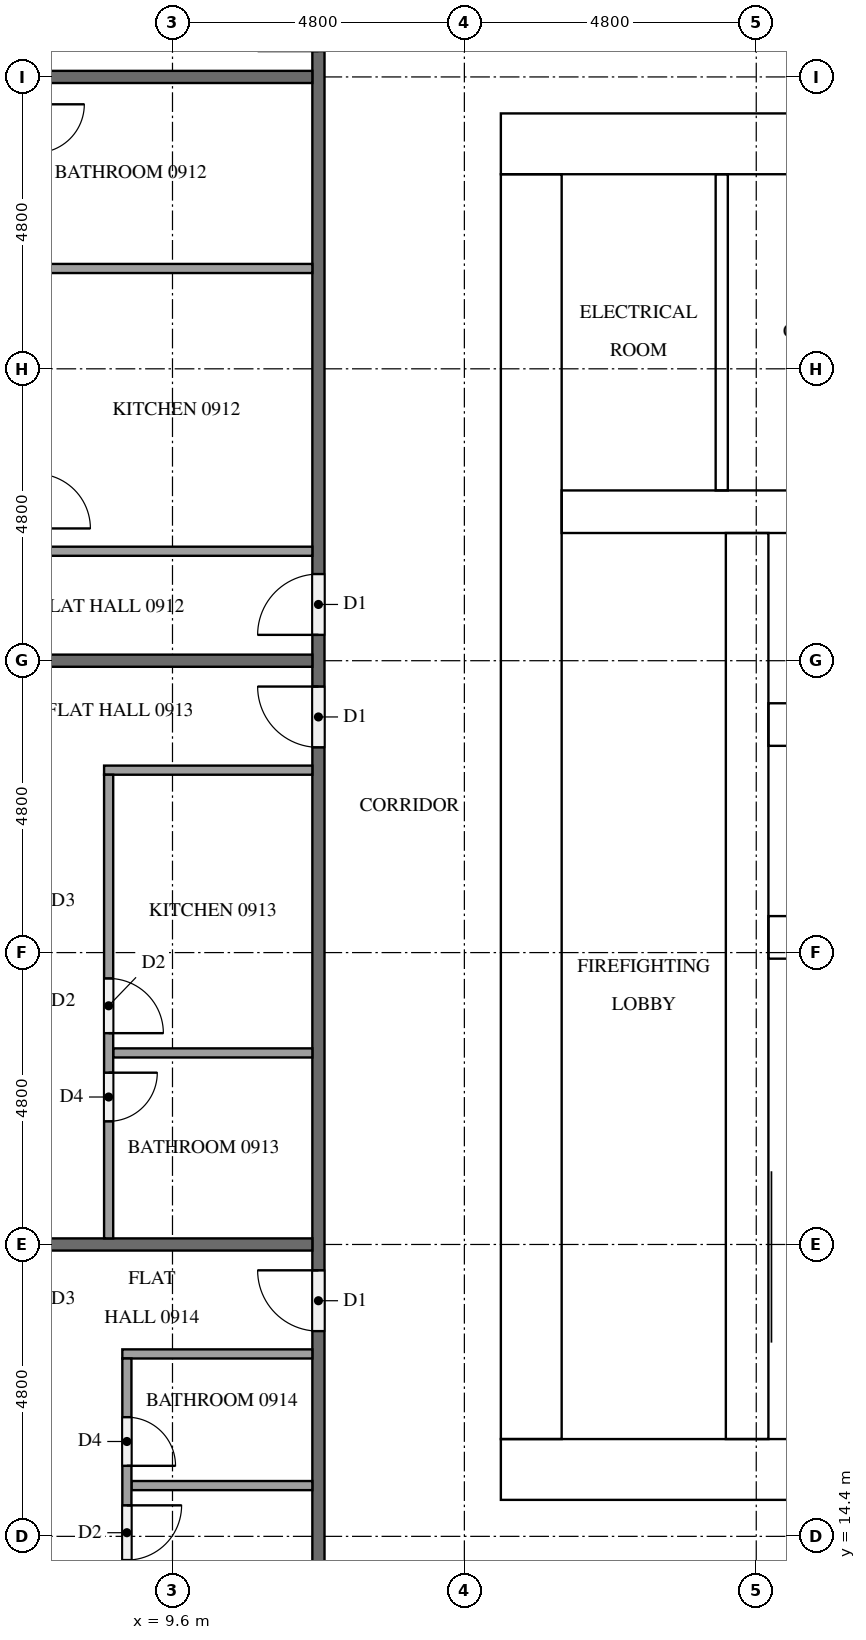
"""IFC4 building model, lengths in metres.
Left out: names, types, materials, properties, quantities, classifications, styles, units other than length and angle.
Written with IfcOpenShell. Run it as: python <this file> out.ifc"""

import sys

from ifc_helpers import new_model, si_unit, direction, frame, frame_2d, origin, place, context, subcontext, project, spatial, rectangle, extrude, element, fill, save


model = new_model("IFC4")
c1 = context("Model", 3, precision=1e-05, world=origin(), true_north=direction((0.0, 1.0)))
c2 = subcontext(c1, "Body", "Model", "MODEL_VIEW")
j1 = project(units=[si_unit("LENGTHUNIT", "METRE"), si_unit("PLANEANGLEUNIT", "RADIAN")], contexts=[c1])
p1 = place(None, origin())
s1 = spatial("IfcSite", under=j1, at=p1, CompositionType="ELEMENT")
p2 = place(p1, origin())
s2 = spatial("IfcBuilding", under=s1, at=p2, CompositionType="ELEMENT")
p3 = place(p2, frame((0.0, 0.0, 39.9)))
s3 = spatial("IfcBuildingStorey", under=s2, at=p3, CompositionType="ELEMENT", Elevation=39.9)
p4 = place(p3, frame((15.0, 15.5, 0.0), z_axis=(0.0, 0.0, 1.0), x_axis=(1.0, 0.0, 0.0)))
e1 = element("IfcWall", 1, at=p4, inside=s3, PredefinedType="SHEAR", context=c2, shape_type="SweptSolid", body=[
    extrude(rectangle(XDim=32.4, YDim=1.0, at=frame_2d((16.2, 0.0))), origin(), (0.0, 0.0, 1.0), 3.2),
])
p5 = place(p4, frame((15.3, 0.0, 0.0)))
e2 = element("IfcOpeningElement", 2, at=p5, cuts=e1, PredefinedType="OPENING", context=c2, shape_type="SweptSolid", body=[
    extrude(rectangle(XDim=1.8, YDim=2.1, at=frame_2d((0.9, 1.05))), frame((0.0, 0.51, 0.0), z_axis=(0.0, -1.0, 0.0), x_axis=(1.0, 0.0, 0.0)), (0.0, 0.0, 1.0), 1.02),
])
p6 = place(p3, frame((15.0, 37.3, 0.0), z_axis=(0.0, 0.0, 1.0), x_axis=(1.0, 0.0, 0.0)))
e3 = element("IfcWall", 3, at=p6, inside=s3, PredefinedType="SHEAR", context=c2, shape_type="SweptSolid", body=[
    extrude(rectangle(XDim=32.4, YDim=1.0, at=frame_2d((16.2, 0.0))), origin(), (0.0, 0.0, 1.0), 3.2),
])
p7 = place(p6, frame((15.3, 0.0, 0.0)))
e4 = element("IfcOpeningElement", 4, at=p7, cuts=e3, PredefinedType="OPENING", context=c2, shape_type="SweptSolid", body=[
    extrude(rectangle(XDim=1.8, YDim=2.1, at=frame_2d((0.9, 1.05))), frame((0.0, 0.51, 0.0), z_axis=(0.0, -1.0, 0.0), x_axis=(1.0, 0.0, 0.0)), (0.0, 0.0, 1.0), 1.02),
])
p8 = place(p6, frame((1.766, 0.0, 0.0)))
e5 = element("IfcOpeningElement", 5, at=p8, cuts=e3, PredefinedType="OPENING", context=c2, shape_type="SweptSolid", body=[
    extrude(rectangle(XDim=1.0, YDim=2.1, at=frame_2d((0.5, 1.05))), frame((0.0, 0.51, 0.0), z_axis=(0.0, -1.0, 0.0), x_axis=(1.0, 0.0, 0.0)), (0.0, 0.0, 1.0), 1.02),
])
p9 = place(p6, frame((5.241, 0.0, 0.0)))
e6 = element("IfcOpeningElement", 6, at=p9, cuts=e3, PredefinedType="OPENING", context=c2, shape_type="SweptSolid", body=[
    extrude(rectangle(XDim=1.0, YDim=2.1, at=frame_2d((0.5, 1.05))), frame((0.0, 0.51, 0.0), z_axis=(0.0, -1.0, 0.0), x_axis=(1.0, 0.0, 0.0)), (0.0, 0.0, 1.0), 1.02),
])
p10 = place(p3, frame((15.5, 16.0, 0.0), z_axis=(0.0, 0.0, 1.0), x_axis=(0.0, 1.0, 0.0)))
e7 = element("IfcWall", 7, at=p10, inside=s3, PredefinedType="SHEAR", context=c2, shape_type="SweptSolid", body=[
    extrude(rectangle(XDim=20.8, YDim=1.0, at=frame_2d((10.4, 0.0))), origin(), (0.0, 0.0, 1.0), 3.2),
])
p11 = place(p10, frame((4.76, 0.0, 0.0)))
e8 = element("IfcOpeningElement", 8, at=p11, cuts=e7, PredefinedType="OPENING", context=c2, shape_type="SweptSolid", body=[
    extrude(rectangle(XDim=1.2, YDim=2.1, at=frame_2d((0.6, 1.05))), frame((0.0, 0.51, 0.0), z_axis=(0.0, -1.0, 0.0), x_axis=(1.0, 0.0, 0.0)), (0.0, 0.0, 1.0), 1.02),
])
p12 = place(p3, frame((19.05, 16.0, 0.0), z_axis=(0.0, 0.0, 1.0), x_axis=(0.0, 1.0, 0.0)))
e9 = element("IfcWall", 9, at=p12, inside=s3, PredefinedType="SHEAR", context=c2, shape_type="SweptSolid", body=[
    extrude(rectangle(XDim=14.9, YDim=0.7, at=frame_2d((7.45, 0.0))), origin(), (0.0, 0.0, 1.0), 3.2),
])
p13 = place(p12, frame((9.45, 0.0, 0.0)))
e10 = element("IfcOpeningElement", 10, at=p13, cuts=e9, PredefinedType="OPENING", context=c2, shape_type="SweptSolid", body=[
    extrude(rectangle(XDim=1.1, YDim=2.1, at=frame_2d((0.55, 1.05))), frame((0.0, 0.36, 0.0), z_axis=(0.0, -1.0, 0.0), x_axis=(1.0, 0.0, 0.0)), (0.0, 0.0, 1.0), 0.72),
])
p14 = place(p12, frame((12.95, 0.0, 0.0)))
e11 = element("IfcOpeningElement", 11, at=p14, cuts=e9, PredefinedType="OPENING", context=c2, shape_type="SweptSolid", body=[
    extrude(rectangle(XDim=1.1, YDim=2.1, at=frame_2d((0.55, 1.05))), frame((0.0, 0.36, 0.0), z_axis=(0.0, -1.0, 0.0), x_axis=(1.0, 0.0, 0.0)), (0.0, 0.0, 1.0), 0.72),
])
p15 = place(p12, frame((0.2, 0.0, 0.0)))
e12 = element("IfcOpeningElement", 12, at=p15, cuts=e9, PredefinedType="OPENING", context=c2, shape_type="SweptSolid", body=[
    extrude(rectangle(XDim=1.2, YDim=2.1, at=frame_2d((0.6, 1.05))), frame((0.0, 0.36, 0.0), z_axis=(0.0, -1.0, 0.0), x_axis=(1.0, 0.0, 0.0)), (0.0, 0.0, 1.0), 0.72),
])
for number, where, z_axis, x_axis in (
    (13, (19.4, 24.25, 0.0), (0.0, 0.0, 1.0), (1.0, 0.0, 0.0)),
    (14, (19.4, 27.75, 0.0), (0.0, 0.0, 1.0), (1.0, 0.0, 0.0)),
):
    element("IfcWall", number, at=place(p3, frame(where, z_axis=z_axis, x_axis=x_axis)), inside=s3, PredefinedType="SHEAR", context=c2, shape_type="SweptSolid", body=[
        extrude(rectangle(XDim=3.35, YDim=0.7, at=frame_2d((1.675, 0.0))), origin(), (0.0, 0.0, 1.0), 3.2),
    ])
p16 = place(p3, frame((16.0, 31.25, 0.0), z_axis=(0.0, 0.0, 1.0), x_axis=(1.0, 0.0, 0.0)))
e15 = element("IfcWall", 15, at=p16, inside=s3, PredefinedType="SHEAR", context=c2, shape_type="SweptSolid", body=[
    extrude(rectangle(XDim=6.75, YDim=0.7, at=frame_2d((3.375, 0.0))), origin(), (0.0, 0.0, 1.0), 3.2),
])
p17 = place(p3, frame((18.633, 31.6, 0.0), z_axis=(0.0, 0.0, 1.0), x_axis=(0.0, 1.0, 0.0)))
e16 = element("IfcWall", 16, at=p17, inside=s3, PredefinedType="PARTITIONING", context=c2, shape_type="SweptSolid", body=[
    extrude(rectangle(XDim=5.2, YDim=0.2, at=frame_2d((2.6, 0.0))), origin(), (0.0, 0.0, 1.0), 3.2),
])
p18 = place(p3, frame((12.0, 12.1, 0.0), z_axis=(0.0, 0.0, 1.0), x_axis=(0.0, 1.0, 0.0)))
e17 = element("IfcWall", 17, at=p18, inside=s3, PredefinedType="PARTITIONING", context=c2, shape_type="SweptSolid", body=[
    extrude(rectangle(XDim=28.6, YDim=0.2, at=frame_2d((14.3, 0.0))), origin(), (0.0, 0.0, 1.0), 3.2),
])
p19 = place(p18, frame((26.725, 0.0, 0.0)))
e18 = element("IfcOpeningElement", 18, at=p19, cuts=e17, PredefinedType="OPENING", context=c2, shape_type="SweptSolid", body=[
    extrude(rectangle(XDim=1.0, YDim=2.1, at=frame_2d((0.5, 1.05))), frame((0.0, 0.11, 0.0), z_axis=(0.0, -1.0, 0.0), x_axis=(1.0, 0.0, 0.0)), (0.0, 0.0, 1.0), 0.22),
])
p20 = place(p18, frame((17.125, 0.0, 0.0)))
e19 = element("IfcOpeningElement", 19, at=p20, cuts=e17, PredefinedType="OPENING", context=c2, shape_type="SweptSolid", body=[
    extrude(rectangle(XDim=1.0, YDim=2.1, at=frame_2d((0.5, 1.05))), frame((0.0, 0.11, 0.0), z_axis=(0.0, -1.0, 0.0), x_axis=(1.0, 0.0, 0.0)), (0.0, 0.0, 1.0), 0.22),
])
p21 = place(p18, frame((15.275, 0.0, 0.0)))
e20 = element("IfcOpeningElement", 20, at=p21, cuts=e17, PredefinedType="OPENING", context=c2, shape_type="SweptSolid", body=[
    extrude(rectangle(XDim=1.0, YDim=2.1, at=frame_2d((0.5, 1.05))), frame((0.0, 0.11, 0.0), z_axis=(0.0, -1.0, 0.0), x_axis=(1.0, 0.0, 0.0)), (0.0, 0.0, 1.0), 0.22),
])
p22 = place(p18, frame((5.675, 0.0, 0.0)))
e21 = element("IfcOpeningElement", 21, at=p22, cuts=e17, PredefinedType="OPENING", context=c2, shape_type="SweptSolid", body=[
    extrude(rectangle(XDim=1.0, YDim=2.1, at=frame_2d((0.5, 1.05))), frame((0.0, 0.11, 0.0), z_axis=(0.0, -1.0, 0.0), x_axis=(1.0, 0.0, 0.0)), (0.0, 0.0, 1.0), 0.22),
])
for number, where, z_axis, x_axis in (
    (22, (0.1, 38.4, 0.0), (0.0, 0.0, 1.0), (1.0, 0.0, 0.0)),
    (23, (0.1, 28.8, 0.0), (0.0, 0.0, 1.0), (1.0, 0.0, 0.0)),
    (24, (0.1, 19.2, 0.0), (0.0, 0.0, 1.0), (1.0, 0.0, 0.0)),
):
    element("IfcWall", number, at=place(p3, frame(where, z_axis=z_axis, x_axis=x_axis)), inside=s3, PredefinedType="PARTITIONING", context=c2, shape_type="SweptSolid", body=[
        extrude(rectangle(XDim=11.8, YDim=0.2, at=frame_2d((5.9, 0.0))), origin(), (0.0, 0.0, 1.0), 3.2),
    ])
p23 = place(p3, frame((11.9, 35.25, 0.0), z_axis=(0.0, 0.0, 1.0), x_axis=(-1.0, 0.0, 0.0)))
e25 = element("IfcWall", 25, at=p23, inside=s3, PredefinedType="PARTITIONING", context=c2, shape_type="SweptSolid", body=[
    extrude(rectangle(XDim=4.475, YDim=0.15, at=frame_2d((2.237, 0.0))), origin(), (0.0, 0.0, 1.0), 3.2),
])
p24 = place(p3, frame((11.9, 30.6, 0.0), z_axis=(0.0, 0.0, 1.0), x_axis=(-1.0, 0.0, 0.0)))
e26 = element("IfcWall", 26, at=p24, inside=s3, PredefinedType="PARTITIONING", context=c2, shape_type="SweptSolid", body=[
    extrude(rectangle(XDim=4.625, YDim=0.15, at=frame_2d((2.312, 0.0))), origin(), (0.0, 0.0, 1.0), 3.2),
])
p25 = place(p3, frame((11.9, 22.35, 0.0), z_axis=(0.0, 0.0, 1.0), x_axis=(-1.0, 0.0, 0.0)))
e27 = element("IfcWall", 27, at=p25, inside=s3, PredefinedType="PARTITIONING", context=c2, shape_type="SweptSolid", body=[
    extrude(rectangle(XDim=3.275, YDim=0.15, at=frame_2d((1.637, 0.0))), origin(), (0.0, 0.0, 1.0), 3.2),
])
p26 = place(p3, frame((11.9, 27.0, 0.0), z_axis=(0.0, 0.0, 1.0), x_axis=(-1.0, 0.0, 0.0)))
e28 = element("IfcWall", 28, at=p26, inside=s3, PredefinedType="PARTITIONING", context=c2, shape_type="SweptSolid", body=[
    extrude(rectangle(XDim=3.425, YDim=0.15, at=frame_2d((1.712, 0.0))), origin(), (0.0, 0.0, 1.0), 3.2),
])
p27 = place(p3, frame((8.55, 26.925, 0.0), z_axis=(0.0, 0.0, 1.0), x_axis=(0.0, -1.0, 0.0)))
e29 = element("IfcWall", 29, at=p27, inside=s3, PredefinedType="PARTITIONING", context=c2, shape_type="SweptSolid", body=[
    extrude(rectangle(XDim=7.625, YDim=0.15, at=frame_2d((3.812, 0.0))), origin(), (0.0, 0.0, 1.0), 3.2),
])
p28 = place(p27, frame((3.35, 0.0, 0.0)))
e30 = element("IfcOpeningElement", 30, at=p28, cuts=e29, PredefinedType="OPENING", context=c2, shape_type="SweptSolid", body=[
    extrude(rectangle(XDim=0.9, YDim=2.1, at=frame_2d((0.45, 1.05))), frame((0.0, 0.085, 0.0), z_axis=(0.0, -1.0, 0.0), x_axis=(1.0, 0.0, 0.0)), (0.0, 0.0, 1.0), 0.17),
])
p29 = place(p27, frame((4.9, 0.0, 0.0)))
e31 = element("IfcOpeningElement", 31, at=p29, cuts=e29, PredefinedType="OPENING", context=c2, shape_type="SweptSolid", body=[
    extrude(rectangle(XDim=0.8, YDim=2.1, at=frame_2d((0.4, 1.05))), frame((0.0, 0.085, 0.0), z_axis=(0.0, -1.0, 0.0), x_axis=(1.0, 0.0, 0.0)), (0.0, 0.0, 1.0), 0.17),
])
p30 = place(p3, frame((11.9, 15.235, 0.0), z_axis=(0.0, 0.0, 1.0), x_axis=(-1.0, 0.0, 0.0)))
e32 = element("IfcWall", 32, at=p30, inside=s3, PredefinedType="PARTITIONING", context=c2, shape_type="SweptSolid", body=[
    extrude(rectangle(XDim=2.975, YDim=0.15, at=frame_2d((1.487, 0.0))), origin(), (0.0, 0.0, 1.0), 3.2),
])
p31 = place(p3, frame((11.9, 17.4, 0.0), z_axis=(0.0, 0.0, 1.0), x_axis=(-1.0, 0.0, 0.0)))
e33 = element("IfcWall", 33, at=p31, inside=s3, PredefinedType="PARTITIONING", context=c2, shape_type="SweptSolid", body=[
    extrude(rectangle(XDim=3.125, YDim=0.15, at=frame_2d((1.562, 0.0))), origin(), (0.0, 0.0, 1.0), 3.2),
])
p32 = place(p3, frame((8.85, 17.325, 0.0), z_axis=(0.0, 0.0, 1.0), x_axis=(0.0, -1.0, 0.0)))
e34 = element("IfcWall", 34, at=p32, inside=s3, PredefinedType="PARTITIONING", context=c2, shape_type="SweptSolid", body=[
    extrude(rectangle(XDim=5.225, YDim=0.15, at=frame_2d((2.612, 0.0))), origin(), (0.0, 0.0, 1.0), 3.2),
])
p33 = place(p32, frame((0.965, 0.0, 0.0)))
e35 = element("IfcOpeningElement", 35, at=p33, cuts=e34, PredefinedType="OPENING", context=c2, shape_type="SweptSolid", body=[
    extrude(rectangle(XDim=0.8, YDim=2.1, at=frame_2d((0.4, 1.05))), frame((0.0, 0.085, 0.0), z_axis=(0.0, -1.0, 0.0), x_axis=(1.0, 0.0, 0.0)), (0.0, 0.0, 1.0), 0.17),
])
p34 = place(p32, frame((2.415, 0.0, 0.0)))
e36 = element("IfcOpeningElement", 36, at=p34, cuts=e34, PredefinedType="OPENING", context=c2, shape_type="SweptSolid", body=[
    extrude(rectangle(XDim=0.9, YDim=2.1, at=frame_2d((0.45, 1.05))), frame((0.0, 0.085, 0.0), z_axis=(0.0, -1.0, 0.0), x_axis=(1.0, 0.0, 0.0)), (0.0, 0.0, 1.0), 0.17),
])
p35 = place(p13, origin())
e37 = element("IfcDoor", 37, at=p35, inside=s3, OperationType="DOUBLE_DOOR_SLIDING", PredefinedType="DOOR", context=c2, shape_type="SweptSolid", body=[
    extrude(rectangle(XDim=1.1, YDim=2.1, at=frame_2d((0.55, 1.05))), frame((0.0, 0.025, 0.0), z_axis=(0.0, -1.0, 0.0), x_axis=(1.0, 0.0, 0.0)), (0.0, 0.0, 1.0), 0.05),
])
fill(e10, e37)
p36 = place(p14, origin())
e38 = element("IfcDoor", 38, at=p36, inside=s3, OperationType="DOUBLE_DOOR_SLIDING", PredefinedType="DOOR", context=c2, shape_type="SweptSolid", body=[
    extrude(rectangle(XDim=1.1, YDim=2.1, at=frame_2d((0.55, 1.05))), frame((0.0, 0.025, 0.0), z_axis=(0.0, -1.0, 0.0), x_axis=(1.0, 0.0, 0.0)), (0.0, 0.0, 1.0), 0.05),
])
fill(e11, e38)
p37 = place(p15, frame((1.2, 0.0, 0.0), z_axis=(0.0, 0.0, 1.0), x_axis=(-1.0, 0.0, 0.0)))
e39 = element("IfcDoor", 39, at=p37, inside=s3, OperationType="SINGLE_SWING_LEFT", PredefinedType="DOOR", context=c2, shape_type="SweptSolid", body=[
    extrude(rectangle(XDim=1.2, YDim=2.1, at=frame_2d((0.6, 1.05))), frame((0.0, 0.025, 0.0), z_axis=(0.0, -1.0, 0.0), x_axis=(1.0, 0.0, 0.0)), (0.0, 0.0, 1.0), 0.05),
])
fill(e12, e39)
p38 = place(p11, frame((1.2, 0.0, 0.0), z_axis=(0.0, 0.0, 1.0), x_axis=(-1.0, 0.0, 0.0)))
e40 = element("IfcDoor", 40, at=p38, inside=s3, OperationType="SINGLE_SWING_RIGHT", PredefinedType="DOOR", context=c2, shape_type="SweptSolid", body=[
    extrude(rectangle(XDim=1.2, YDim=2.1, at=frame_2d((0.6, 1.05))), frame((0.0, 0.025, 0.0), z_axis=(0.0, -1.0, 0.0), x_axis=(1.0, 0.0, 0.0)), (0.0, 0.0, 1.0), 0.05),
])
fill(e8, e40)
p39 = place(p8, origin())
e41 = element("IfcDoor", 41, at=p39, inside=s3, OperationType="SINGLE_SWING_RIGHT", PredefinedType="DOOR", context=c2, shape_type="SweptSolid", body=[
    extrude(rectangle(XDim=1.0, YDim=2.1, at=frame_2d((0.5, 1.05))), frame((0.0, 0.025, 0.0), z_axis=(0.0, -1.0, 0.0), x_axis=(1.0, 0.0, 0.0)), (0.0, 0.0, 1.0), 0.05),
])
fill(e5, e41)
p40 = place(p20, origin())
e42 = element("IfcDoor", 42, at=p40, inside=s3, OperationType="SINGLE_SWING_LEFT", PredefinedType="DOOR", context=c2, shape_type="SweptSolid", body=[
    extrude(rectangle(XDim=1.0, YDim=2.1, at=frame_2d((0.5, 1.05))), frame((0.0, 0.025, 0.0), z_axis=(0.0, -1.0, 0.0), x_axis=(1.0, 0.0, 0.0)), (0.0, 0.0, 1.0), 0.05),
])
fill(e19, e42)
p41 = place(p21, origin())
e43 = element("IfcDoor", 43, at=p41, inside=s3, OperationType="SINGLE_SWING_RIGHT", PredefinedType="DOOR", context=c2, shape_type="SweptSolid", body=[
    extrude(rectangle(XDim=1.0, YDim=2.1, at=frame_2d((0.5, 1.05))), frame((0.0, 0.025, 0.0), z_axis=(0.0, -1.0, 0.0), x_axis=(1.0, 0.0, 0.0)), (0.0, 0.0, 1.0), 0.05),
])
fill(e20, e43)
p42 = place(p22, origin())
e44 = element("IfcDoor", 44, at=p42, inside=s3, OperationType="SINGLE_SWING_RIGHT", PredefinedType="DOOR", context=c2, shape_type="SweptSolid", body=[
    extrude(rectangle(XDim=1.0, YDim=2.1, at=frame_2d((0.5, 1.05))), frame((0.0, 0.025, 0.0), z_axis=(0.0, -1.0, 0.0), x_axis=(1.0, 0.0, 0.0)), (0.0, 0.0, 1.0), 0.05),
])
fill(e21, e44)
p43 = place(p28, origin())
e45 = element("IfcDoor", 45, at=p43, inside=s3, OperationType="SINGLE_SWING_RIGHT", PredefinedType="DOOR", context=c2, shape_type="SweptSolid", body=[
    extrude(rectangle(XDim=0.9, YDim=2.1, at=frame_2d((0.45, 1.05))), frame((0.0, 0.025, 0.0), z_axis=(0.0, -1.0, 0.0), x_axis=(1.0, 0.0, 0.0)), (0.0, 0.0, 1.0), 0.05),
])
fill(e30, e45)
p44 = place(p29, origin())
e46 = element("IfcDoor", 46, at=p44, inside=s3, OperationType="SINGLE_SWING_LEFT", PredefinedType="DOOR", context=c2, shape_type="SweptSolid", body=[
    extrude(rectangle(XDim=0.8, YDim=2.1, at=frame_2d((0.4, 1.05))), frame((0.0, 0.025, 0.0), z_axis=(0.0, -1.0, 0.0), x_axis=(1.0, 0.0, 0.0)), (0.0, 0.0, 1.0), 0.05),
])
fill(e31, e46)
p45 = place(p33, origin())
e47 = element("IfcDoor", 47, at=p45, inside=s3, OperationType="SINGLE_SWING_RIGHT", PredefinedType="DOOR", context=c2, shape_type="SweptSolid", body=[
    extrude(rectangle(XDim=0.8, YDim=2.1, at=frame_2d((0.4, 1.05))), frame((0.0, 0.025, 0.0), z_axis=(0.0, -1.0, 0.0), x_axis=(1.0, 0.0, 0.0)), (0.0, 0.0, 1.0), 0.05),
])
fill(e35, e47)
p46 = place(p34, origin())
e48 = element("IfcDoor", 48, at=p46, inside=s3, OperationType="SINGLE_SWING_LEFT", PredefinedType="DOOR", context=c2, shape_type="SweptSolid", body=[
    extrude(rectangle(XDim=0.9, YDim=2.1, at=frame_2d((0.45, 1.05))), frame((0.0, 0.025, 0.0), z_axis=(0.0, -1.0, 0.0), x_axis=(1.0, 0.0, 0.0)), (0.0, 0.0, 1.0), 0.05),
])
fill(e36, e48)
save(model, sys.argv[1])
